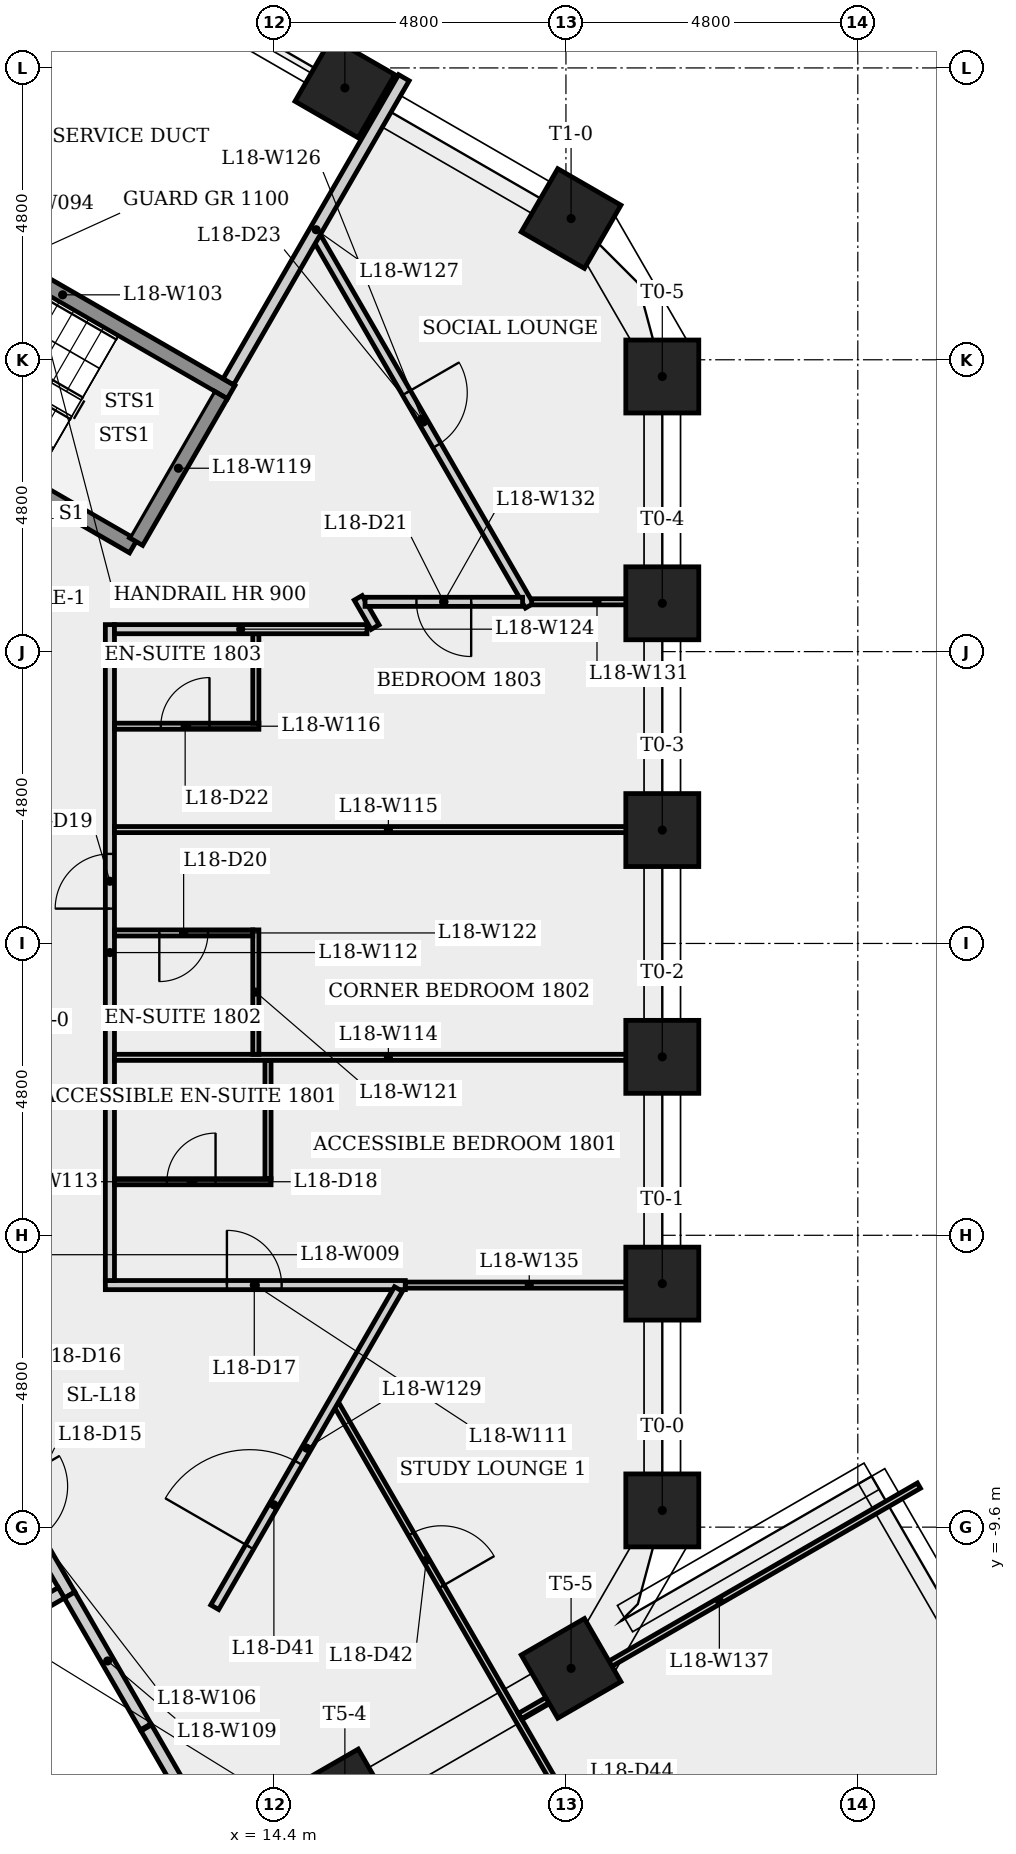
"""IFC4 building model, lengths in metres.
Left out: names, types, materials, properties, quantities, classifications, styles, units other than length and angle.
Written with IfcOpenShell. Run it as: python <this file> out.ifc"""

import sys

from ifc_helpers import new_model, si_unit, direction, frame, frame_2d, origin, origin_2d, place, context, subcontext, project, spatial, rectangle, extrude, element, fill, save


model = new_model("IFC4")
c1 = context("Model", 3, precision=1e-05, world=origin(), true_north=direction((0.0, 1.0)))
c2 = subcontext(c1, "Body", "Model", "MODEL_VIEW")
j1 = project(units=[si_unit("LENGTHUNIT", "METRE"), si_unit("PLANEANGLEUNIT", "RADIAN")], contexts=[c1])
p1 = place(None, origin())
s1 = spatial("IfcSite", under=j1, at=p1, CompositionType="ELEMENT")
p2 = place(p1, origin())
s2 = spatial("IfcBuilding", under=s1, at=p2, CompositionType="ELEMENT")
p3 = place(p2, frame((0.0, 0.0, 70.3)))
s3 = spatial("IfcBuildingStorey", under=s2, at=p3, CompositionType="ELEMENT", Elevation=70.3)
for number, where, z_axis, x_axis in (
    (1, (20.785, -9.325, 0.0), (0.0, 0.0, 1.0), (1.0, 0.0, 0.0)),
    (2, (20.785, -5.595, 0.0), (0.0, 0.0, 1.0), (1.0, 0.0, 0.0)),
    (3, (20.785, -1.865, 0.0), (0.0, 0.0, 1.0), (1.0, 0.0, 0.0)),
    (4, (20.785, 1.865, 0.0), (0.0, 0.0, 1.0), (1.0, 0.0, 0.0)),
    (5, (20.785, 5.595, 0.0), (0.0, 0.0, 1.0), (1.0, 0.0, 0.0)),
    (6, (20.785, 9.325, 0.0), (0.0, 0.0, 1.0), (1.0, 0.0, 0.0)),
    (7, (19.285, 11.923, 0.0), (0.0, 0.0, 1.0), (0.5, 0.866, 0.0)),
    (8, (15.564, 14.071, 0.0), (0.0, 0.0, 1.0), (0.5, 0.866, 0.0)),
    (9, (15.564, -14.071, 0.0), (0.0, 0.0, 1.0), (0.5, -0.866, 0.0)),
    (10, (19.285, -11.923, 0.0), (0.0, 0.0, 1.0), (0.5, -0.866, 0.0)),
):
    element("IfcColumn", number, at=place(p3, frame(where, z_axis=z_axis, x_axis=x_axis)), inside=s3, PredefinedType="COLUMN", context=c2, shape_type="SweptSolid", body=[
        extrude(rectangle(XDim=1.2, YDim=1.2, at=origin_2d()), origin(), (0.0, 0.0, 1.0), 4.0),
    ])
p4 = place(p3, frame((8.151, 12.268, 0.0), z_axis=(0.0, 0.0, 1.0), x_axis=(0.866025499775, -0.499999833739, 0.0)))
e11 = element("IfcWall", 11, at=p4, inside=s3, PredefinedType="SHEAR", context=c2, shape_type="SweptSolid", body=[
    extrude(rectangle(XDim=6.4, YDim=0.25, at=frame_2d((3.2, 0.0))), origin(), (0.0, 0.0, 1.0), 3.6),
])
p5 = place(p3, frame((9.537, -8.119, 0.0), z_axis=(0.0, 0.0, 1.0), x_axis=(0.499990139034, -0.866031096941, 0.0)))
e12 = element("IfcWall", 12, at=p5, inside=s3, PredefinedType="PARTITIONING", context=c2, shape_type="SweptSolid", body=[
    extrude(rectangle(XDim=3.0, YDim=0.2, at=frame_2d((1.5, 0.0))), origin(), (0.0, 0.0, 1.0), 3.6),
])
p6 = place(p5, frame((0.935, 0.0, 0.0)))
e13 = element("IfcOpeningElement", 13, at=p6, cuts=e12, PredefinedType="OPENING", context=c2, shape_type="SweptSolid", body=[
    extrude(rectangle(XDim=1.0, YDim=2.1, at=frame_2d((0.5, 1.05))), frame((0.0, 0.11, 0.0), z_axis=(0.0, -1.0, 0.0), x_axis=(1.0, 0.0, 0.0)), (0.0, 0.0, 1.0), 0.22),
])
p7 = place(p3, frame((10.901, -10.681, 0.0), z_axis=(0.0, 0.0, 1.0), x_axis=(-0.866007538022, -0.500030943131, 0.0)))
e14 = element("IfcWall", 14, at=p7, inside=s3, PredefinedType="PLUMBINGWALL", context=c2, shape_type="SweptSolid", body=[
    extrude(rectangle(XDim=2.375, YDim=0.2, at=frame_2d((1.188, 0.0))), origin(), (0.0, 0.0, 1.0), 3.6),
])
p8 = place(p3, frame((11.037, -10.717, 0.0), z_axis=(0.0, 0.0, 1.0), x_axis=(0.499989877761, -0.866031247783, 0.0)))
e15 = element("IfcWall", 15, at=p8, inside=s3, PredefinedType="PLUMBINGWALL", context=c2, shape_type="SweptSolid", body=[
    extrude(rectangle(XDim=2.502, YDim=0.2, at=frame_2d((1.251, 0.0))), origin(), (0.0, 0.0, 1.0), 3.6),
])
p9 = place(p3, frame((11.1, 7.101, 0.0), z_axis=(0.0, 0.0, 1.0), x_axis=(-0.8660265141, 0.499998076872, 0.0)))
e16 = element("IfcWall", 16, at=p9, inside=s3, PredefinedType="SHEAR", context=c2, shape_type="SweptSolid", body=[
    extrude(rectangle(XDim=5.137, YDim=0.25, at=frame_2d((2.569, 0.0))), origin(), (0.0, 0.0, 1.0), 3.6),
])
p10 = place(p9, frame((3.987, 0.0, 0.0)))
e17 = element("IfcOpeningElement", 17, at=p10, cuts=e16, PredefinedType="OPENING", context=c2, shape_type="SweptSolid", body=[
    extrude(rectangle(XDim=1.0, YDim=2.1, at=frame_2d((0.5, 1.05))), frame((0.0, 0.135, 0.0), z_axis=(0.0, -1.0, 0.0), x_axis=(1.0, 0.0, 0.0)), (0.0, 0.0, 1.0), 0.27),
])
p11 = place(p3, frame((11.625, -5.619, 0.0), z_axis=(0.0, 0.0, 1.0), x_axis=(1.0, 0.0, 0.0)))
e18 = element("IfcWall", 18, at=p11, inside=s3, PredefinedType="PARTITIONING", context=c2, shape_type="SweptSolid", body=[
    extrude(rectangle(XDim=4.933, YDim=0.15, at=frame_2d((2.467, 0.0))), origin(), (0.0, 0.0, 1.0), 3.6),
])
p12 = place(p11, frame((1.999, 0.0, 0.0)))
e19 = element("IfcOpeningElement", 19, at=p12, cuts=e18, PredefinedType="OPENING", context=c2, shape_type="SweptSolid", body=[
    extrude(rectangle(XDim=0.9, YDim=2.1, at=frame_2d((0.45, 1.05))), frame((0.0, 0.085, 0.0), z_axis=(0.0, -1.0, 0.0), x_axis=(1.0, 0.0, 0.0)), (0.0, 0.0, 1.0), 0.17),
])
p13 = place(p3, frame((11.7, -5.544, 0.0), z_axis=(0.0, 0.0, 1.0), x_axis=(0.0, 1.0, 0.0)))
e20 = element("IfcWall", 20, at=p13, inside=s3, PredefinedType="PARTITIONING", context=c2, shape_type="SweptSolid", body=[
    extrude(rectangle(XDim=10.788, YDim=0.15, at=frame_2d((5.394, 0.0))), origin(), (0.0, 0.0, 1.0), 3.6),
])
p14 = place(p13, frame((6.117, 0.0, 0.0)))
e21 = element("IfcOpeningElement", 21, at=p14, cuts=e20, PredefinedType="OPENING", context=c2, shape_type="SweptSolid", body=[
    extrude(rectangle(XDim=0.9, YDim=2.1, at=frame_2d((0.45, 1.05))), frame((0.0, 0.085, 0.0), z_axis=(0.0, -1.0, 0.0), x_axis=(1.0, 0.0, 0.0)), (0.0, 0.0, 1.0), 0.17),
])
p15 = place(p3, frame((11.775, -3.919, 0.0), z_axis=(0.0, 0.0, 1.0), x_axis=(1.0, 0.0, 0.0)))
e22 = element("IfcWall", 22, at=p15, inside=s3, PredefinedType="PARTITIONING", context=c2, shape_type="SweptSolid", body=[
    extrude(rectangle(XDim=2.575, YDim=0.1, at=frame_2d((1.288, 0.0))), origin(), (0.0, 0.0, 1.0), 3.6),
])
p16 = place(p15, frame((0.863, 0.0, 0.0)))
e23 = element("IfcOpeningElement", 23, at=p16, cuts=e22, PredefinedType="OPENING", context=c2, shape_type="SweptSolid", body=[
    extrude(rectangle(XDim=0.8, YDim=2.1, at=frame_2d((0.4, 1.05))), frame((0.0, 0.06, 0.0), z_axis=(0.0, -1.0, 0.0), x_axis=(1.0, 0.0, 0.0)), (0.0, 0.0, 1.0), 0.12),
])
for number, where, z_axis, x_axis in (
    (24, (11.775, -1.873, 0.0), (0.0, 0.0, 1.0), (1.0, 0.0, 0.0)),
    (25, (11.775, 1.873, 0.0), (0.0, 0.0, 1.0), (1.0, 0.0, 0.0)),
):
    element("IfcWall", number, at=place(p3, frame(where, z_axis=z_axis, x_axis=x_axis)), inside=s3, PredefinedType="PARTITIONING", context=c2, shape_type="SweptSolid", body=[
        extrude(rectangle(XDim=9.01, YDim=0.1, at=frame_2d((4.505, 0.0))), origin(), (0.0, 0.0, 1.0), 3.6),
    ])
p17 = place(p3, frame((11.775, 3.573, 0.0), z_axis=(0.0, 0.0, 1.0), x_axis=(1.0, 0.0, 0.0)))
e26 = element("IfcWall", 26, at=p17, inside=s3, PredefinedType="PARTITIONING", context=c2, shape_type="SweptSolid", body=[
    extrude(rectangle(XDim=2.375, YDim=0.1, at=frame_2d((1.188, 0.0))), origin(), (0.0, 0.0, 1.0), 3.6),
])
p18 = place(p17, frame((0.762, 0.0, 0.0)))
e27 = element("IfcOpeningElement", 27, at=p18, cuts=e26, PredefinedType="OPENING", context=c2, shape_type="SweptSolid", body=[
    extrude(rectangle(XDim=0.8, YDim=2.1, at=frame_2d((0.4, 1.05))), frame((0.0, 0.06, 0.0), z_axis=(0.0, -1.0, 0.0), x_axis=(1.0, 0.0, 0.0)), (0.0, 0.0, 1.0), 0.12),
])
p19 = place(p3, frame((12.085, 6.532, 0.0), z_axis=(0.0, 0.0, 1.0), x_axis=(-0.86604373436, 0.499968249168, 0.0)))
e28 = element("IfcWall", 28, at=p19, inside=s3, PredefinedType="SHEAR", context=c2, shape_type="SweptSolid", body=[
    extrude(rectangle(XDim=1.118, YDim=0.25, at=frame_2d((0.559, 0.0))), origin(), (0.0, 0.0, 1.0), 3.6),
])
p20 = place(p3, frame((12.299, -12.902, 0.0), z_axis=(0.0, 0.0, 1.0), x_axis=(0.500049332001, -0.865996920067, 0.0)))
e29 = element("IfcWall", 29, at=p20, inside=s3, PredefinedType="PLUMBINGWALL", context=c2, shape_type="SweptSolid", body=[
    extrude(rectangle(XDim=2.78, YDim=0.2, at=frame_2d((1.39, 0.0))), origin(), (0.0, 0.0, 1.0), 3.6),
])
p21 = place(p3, frame((13.523, 9.022, 0.0), z_axis=(0.0, 0.0, 1.0), x_axis=(-0.500013277472, -0.866017737897, 0.0)))
e30 = element("IfcWall", 30, at=p21, inside=s3, PredefinedType="SHEAR", context=c2, shape_type="SweptSolid", body=[
    extrude(rectangle(XDim=2.786, YDim=0.25, at=frame_2d((1.393, 0.0))), origin(), (0.0, 0.0, 1.0), 3.6),
])
p22 = place(p3, frame((14.1, -1.823, 0.0), z_axis=(0.0, 0.0, 1.0), x_axis=(0.0, 1.0, 0.0)))
e31 = element("IfcWall", 31, at=p22, inside=s3, PredefinedType="PARTITIONING", context=c2, shape_type="SweptSolid", body=[
    extrude(rectangle(XDim=2.046, YDim=0.1, at=frame_2d((1.023, 0.0))), origin(), (0.0, 0.0, 1.0), 3.6),
])
p23 = place(p3, frame((14.05, 0.173, 0.0), z_axis=(0.0, 0.0, 1.0), x_axis=(-1.0, 0.0, 0.0)))
e32 = element("IfcWall", 32, at=p23, inside=s3, PredefinedType="PARTITIONING", context=c2, shape_type="SweptSolid", body=[
    extrude(rectangle(XDim=2.275, YDim=0.1, at=frame_2d((1.138, 0.0))), origin(), (0.0, 0.0, 1.0), 3.6),
])
p24 = place(p23, frame((0.738, 0.0, 0.0)))
e33 = element("IfcOpeningElement", 33, at=p24, cuts=e32, PredefinedType="OPENING", context=c2, shape_type="SweptSolid", body=[
    extrude(rectangle(XDim=0.8, YDim=2.1, at=frame_2d((0.4, 1.05))), frame((0.0, 0.06, 0.0), z_axis=(0.0, -1.0, 0.0), x_axis=(1.0, 0.0, 0.0)), (0.0, 0.0, 1.0), 0.12),
])
p25 = place(p3, frame((14.1, 3.623, 0.0), z_axis=(0.0, 0.0, 1.0), x_axis=(0.0, 1.0, 0.0)))
e34 = element("IfcWall", 34, at=p25, inside=s3, PredefinedType="PARTITIONING", context=c2, shape_type="SweptSolid", body=[
    extrude(rectangle(XDim=1.471, YDim=0.1, at=frame_2d((0.735, 0.0))), origin(), (0.0, 0.0, 1.0), 3.6),
])
p26 = place(p3, frame((11.775, 5.169, 0.0), z_axis=(0.0, 0.0, 1.0), x_axis=(1.0, 0.0, 0.0)))
e35 = element("IfcWall", 35, at=p26, inside=s3, PredefinedType="PARTITIONING", context=c2, shape_type="SweptSolid", body=[
    extrude(rectangle(XDim=4.153, YDim=0.15, at=frame_2d((2.077, 0.0))), origin(), (0.0, 0.0, 1.0), 3.6),
])
p27 = place(p3, frame((14.3, -3.869, 0.0), z_axis=(0.0, 0.0, 1.0), x_axis=(0.0, 1.0, 0.0)))
e36 = element("IfcWall", 36, at=p27, inside=s3, PredefinedType="PARTITIONING", context=c2, shape_type="SweptSolid", body=[
    extrude(rectangle(XDim=1.946, YDim=0.1, at=frame_2d((0.973, 0.0))), origin(), (0.0, 0.0, 1.0), 3.6),
])
p28 = place(p3, frame((15.11, 11.598, 0.0), z_axis=(0.0, 0.0, 1.0), x_axis=(0.499976825411, -0.866038783226, 0.0)))
e37 = element("IfcWall", 37, at=p28, inside=s3, PredefinedType="PARTITIONING", context=c2, shape_type="SweptSolid", body=[
    extrude(rectangle(XDim=6.979, YDim=0.15, at=frame_2d((3.489, 0.0))), origin(), (0.0, 0.0, 1.0), 3.6),
])
p29 = place(p28, frame((2.935, 0.0, 0.0)))
e38 = element("IfcOpeningElement", 38, at=p29, cuts=e37, PredefinedType="OPENING", context=c2, shape_type="SweptSolid", body=[
    extrude(rectangle(XDim=1.0, YDim=2.1, at=frame_2d((0.5, 1.05))), frame((0.0, 0.085, 0.0), z_axis=(0.0, -1.0, 0.0), x_axis=(1.0, 0.0, 0.0)), (0.0, 0.0, 1.0), 0.17),
])
p30 = place(p3, frame((13.648, 9.239, 0.0), z_axis=(0.0, 0.0, 1.0), x_axis=(0.499977455708, 0.866038419346, 0.0)))
e39 = element("IfcWall", 39, at=p30, inside=s3, PredefinedType="PLUMBINGWALL", context=c2, shape_type="SweptSolid", body=[
    extrude(rectangle(XDim=5.774, YDim=0.2, at=frame_2d((2.887, 0.0))), origin(), (0.0, 0.0, 1.0), 3.6),
])
p31 = place(p3, frame((15.425, -7.583, 0.0), z_axis=(0.0, 0.0, 1.0), x_axis=(0.499995650065, -0.866027915206, 0.0)))
e40 = element("IfcWall", 40, at=p31, inside=s3, PredefinedType="PARTITIONING", context=c2, shape_type="SweptSolid", body=[
    extrude(rectangle(XDim=17.328, YDim=0.1, at=frame_2d((8.664, 0.0))), origin(), (0.0, 0.0, 1.0), 3.6),
])
p32 = place(p31, frame((2.458, 0.0, 0.0)))
e41 = element("IfcOpeningElement", 41, at=p32, cuts=e40, PredefinedType="OPENING", context=c2, shape_type="SweptSolid", body=[
    extrude(rectangle(XDim=1.0, YDim=2.1, at=frame_2d((0.5, 1.05))), frame((0.0, 0.06, 0.0), z_axis=(0.0, -1.0, 0.0), x_axis=(1.0, 0.0, 0.0)), (0.0, 0.0, 1.0), 0.12),
])
p33 = place(p31, frame((8.929, 0.0, 0.0)))
e42 = element("IfcOpeningElement", 42, at=p33, cuts=e40, PredefinedType="OPENING", context=c2, shape_type="SweptSolid", body=[
    extrude(rectangle(XDim=1.6, YDim=2.1, at=frame_2d((0.8, 1.05))), frame((0.0, 0.06, 0.0), z_axis=(0.0, -1.0, 0.0), x_axis=(1.0, 0.0, 0.0)), (0.0, 0.0, 1.0), 0.12),
])
p34 = place(p31, frame((14.935, 0.0, 0.0)))
e43 = element("IfcOpeningElement", 43, at=p34, cuts=e40, PredefinedType="OPENING", context=c2, shape_type="SweptSolid", body=[
    extrude(rectangle(XDim=1.0, YDim=2.1, at=frame_2d((0.5, 1.05))), frame((0.0, 0.06, 0.0), z_axis=(0.0, -1.0, 0.0), x_axis=(1.0, 0.0, 0.0)), (0.0, 0.0, 1.0), 0.12),
])
p35 = place(p3, frame((13.424, -10.918, 0.0), z_axis=(0.0, 0.0, 1.0), x_axis=(0.499992877875, 0.866029515706, 0.0)))
e44 = element("IfcWall", 44, at=p35, inside=s3, PredefinedType="PARTITIONING", context=c2, shape_type="SweptSolid", body=[
    extrude(rectangle(XDim=6.043, YDim=0.15, at=frame_2d((3.022, 0.0))), origin(), (0.0, 0.0, 1.0), 3.6),
])
p36 = place(p35, frame((1.146, 0.0, 0.0)))
e45 = element("IfcOpeningElement", 45, at=p36, cuts=e44, PredefinedType="OPENING", context=c2, shape_type="SweptSolid", body=[
    extrude(rectangle(XDim=1.6, YDim=2.1, at=frame_2d((0.8, 1.05))), frame((0.0, 0.085, 0.0), z_axis=(0.0, -1.0, 0.0), x_axis=(1.0, 0.0, 0.0)), (0.0, 0.0, 1.0), 0.17),
])
p37 = place(p3, frame((15.784, 5.684, 0.0), z_axis=(0.0, 0.0, 1.0), x_axis=(0.49987468637, -0.866097741555, 0.0)))
e46 = element("IfcWall", 46, at=p37, inside=s3, PredefinedType="PARTITIONING", context=c2, shape_type="SweptSolid", body=[
    extrude(rectangle(XDim=0.555, YDim=0.15, at=frame_2d((0.278, 0.0))), origin(), (0.0, 0.0, 1.0), 3.6),
])
p38 = place(p3, frame((18.637, 5.619, 0.0), z_axis=(0.0, 0.0, 1.0), x_axis=(1.0, 0.0, 0.0)))
e47 = element("IfcWall", 47, at=p38, inside=s3, PredefinedType="PARTITIONING", context=c2, shape_type="SweptSolid", body=[
    extrude(rectangle(XDim=2.148, YDim=0.1, at=frame_2d((1.074, 0.0))), origin(), (0.0, 0.0, 1.0), 3.6),
])
p39 = place(p3, frame((18.487, 5.619, 0.0), z_axis=(0.0, 0.0, 1.0), x_axis=(-1.0, 0.0, 0.0)))
e48 = element("IfcWall", 48, at=p39, inside=s3, PredefinedType="PARTITIONING", context=c2, shape_type="SweptSolid", body=[
    extrude(rectangle(XDim=2.591, YDim=0.15, at=frame_2d((1.295, 0.0))), origin(), (0.0, 0.0, 1.0), 3.6),
])
p40 = place(p39, frame((0.845, 0.0, 0.0)))
e49 = element("IfcOpeningElement", 49, at=p40, cuts=e48, PredefinedType="OPENING", context=c2, shape_type="SweptSolid", body=[
    extrude(rectangle(XDim=0.9, YDim=2.1, at=frame_2d((0.45, 1.05))), frame((0.0, 0.085, 0.0), z_axis=(0.0, -1.0, 0.0), x_axis=(1.0, 0.0, 0.0)), (0.0, 0.0, 1.0), 0.17),
])
p41 = place(p3, frame((20.635, -5.619, 0.0), z_axis=(0.0, 0.0, 1.0), x_axis=(-1.0, 0.0, 0.0)))
e50 = element("IfcWall", 50, at=p41, inside=s3, PredefinedType="PARTITIONING", context=c2, shape_type="SweptSolid", body=[
    extrude(rectangle(XDim=4.077, YDim=0.1, at=frame_2d((2.038, 0.0))), origin(), (0.0, 0.0, 1.0), 3.6),
])
p42 = place(p3, frame((25.005, -8.917, 0.0), z_axis=(0.0, 0.0, 1.0), x_axis=(-0.866026268399, -0.49999850244, 0.0)))
e51 = element("IfcWall", 51, at=p42, inside=s3, PredefinedType="PARTITIONING", context=c2, shape_type="SweptSolid", body=[
    extrude(rectangle(XDim=7.579, YDim=0.1, at=frame_2d((3.79, 0.0))), origin(), (0.0, 0.0, 1.0), 2.675),
])
p43 = place(p12, origin())
e52 = element("IfcDoor", 52, at=p43, inside=s3, OperationType="SINGLE_SWING_LEFT", PredefinedType="DOOR", context=c2, shape_type="SweptSolid", body=[
    extrude(rectangle(XDim=0.9, YDim=2.1, at=frame_2d((0.45, 1.05))), frame((0.0, 0.025, 0.0), z_axis=(0.0, -1.0, 0.0), x_axis=(1.0, 0.0, 0.0)), (0.0, 0.0, 1.0), 0.05),
])
fill(e19, e52)
p44 = place(p16, origin())
e53 = element("IfcDoor", 53, at=p44, inside=s3, OperationType="SINGLE_SWING_RIGHT", PredefinedType="DOOR", context=c2, shape_type="SweptSolid", body=[
    extrude(rectangle(XDim=0.8, YDim=2.1, at=frame_2d((0.4, 1.05))), frame((0.0, 0.025, 0.0), z_axis=(0.0, -1.0, 0.0), x_axis=(1.0, 0.0, 0.0)), (0.0, 0.0, 1.0), 0.05),
])
fill(e23, e53)
p45 = place(p14, origin())
e54 = element("IfcDoor", 54, at=p45, inside=s3, OperationType="SINGLE_SWING_LEFT", PredefinedType="DOOR", context=c2, shape_type="SweptSolid", body=[
    extrude(rectangle(XDim=0.9, YDim=2.1, at=frame_2d((0.45, 1.05))), frame((0.0, 0.025, 0.0), z_axis=(0.0, -1.0, 0.0), x_axis=(1.0, 0.0, 0.0)), (0.0, 0.0, 1.0), 0.05),
])
fill(e21, e54)
p46 = place(p24, origin())
e55 = element("IfcDoor", 55, at=p46, inside=s3, OperationType="SINGLE_SWING_RIGHT", PredefinedType="DOOR", context=c2, shape_type="SweptSolid", body=[
    extrude(rectangle(XDim=0.8, YDim=2.1, at=frame_2d((0.4, 1.05))), frame((0.0, 0.025, 0.0), z_axis=(0.0, -1.0, 0.0), x_axis=(1.0, 0.0, 0.0)), (0.0, 0.0, 1.0), 0.05),
])
fill(e33, e55)
p47 = place(p40, origin())
e56 = element("IfcDoor", 56, at=p47, inside=s3, OperationType="SINGLE_SWING_LEFT", PredefinedType="DOOR", context=c2, shape_type="SweptSolid", body=[
    extrude(rectangle(XDim=0.9, YDim=2.1, at=frame_2d((0.45, 1.05))), frame((0.0, 0.025, 0.0), z_axis=(0.0, -1.0, 0.0), x_axis=(1.0, 0.0, 0.0)), (0.0, 0.0, 1.0), 0.05),
])
fill(e49, e56)
p48 = place(p18, origin())
e57 = element("IfcDoor", 57, at=p48, inside=s3, OperationType="SINGLE_SWING_RIGHT", PredefinedType="DOOR", context=c2, shape_type="SweptSolid", body=[
    extrude(rectangle(XDim=0.8, YDim=2.1, at=frame_2d((0.4, 1.05))), frame((0.0, 0.025, 0.0), z_axis=(0.0, -1.0, 0.0), x_axis=(1.0, 0.0, 0.0)), (0.0, 0.0, 1.0), 0.05),
])
fill(e27, e57)
p49 = place(p29, origin())
e58 = element("IfcDoor", 58, at=p49, inside=s3, OperationType="SINGLE_SWING_LEFT", PredefinedType="DOOR", context=c2, shape_type="SweptSolid", body=[
    extrude(rectangle(XDim=1.0, YDim=2.1, at=frame_2d((0.5, 1.05))), frame((0.0, 0.025, 0.0), z_axis=(0.0, -1.0, 0.0), x_axis=(1.0, 0.0, 0.0)), (0.0, 0.0, 1.0), 0.05),
])
fill(e38, e58)
p50 = place(p36, origin())
e59 = element("IfcDoor", 59, at=p50, inside=s3, OperationType="SINGLE_SWING_LEFT", PredefinedType="DOOR", context=c2, shape_type="SweptSolid", body=[
    extrude(rectangle(XDim=1.6, YDim=2.1, at=frame_2d((0.8, 1.05))), frame((0.0, 0.025, 0.0), z_axis=(0.0, -1.0, 0.0), x_axis=(1.0, 0.0, 0.0)), (0.0, 0.0, 1.0), 0.05),
])
fill(e45, e59)
p51 = place(p32, origin())
e60 = element("IfcDoor", 60, at=p51, inside=s3, OperationType="SINGLE_SWING_RIGHT", PredefinedType="DOOR", context=c2, shape_type="SweptSolid", body=[
    extrude(rectangle(XDim=1.0, YDim=2.1, at=frame_2d((0.5, 1.05))), frame((0.0, 0.025, 0.0), z_axis=(0.0, -1.0, 0.0), x_axis=(1.0, 0.0, 0.0)), (0.0, 0.0, 1.0), 0.05),
])
fill(e41, e60)
save(model, sys.argv[1])
